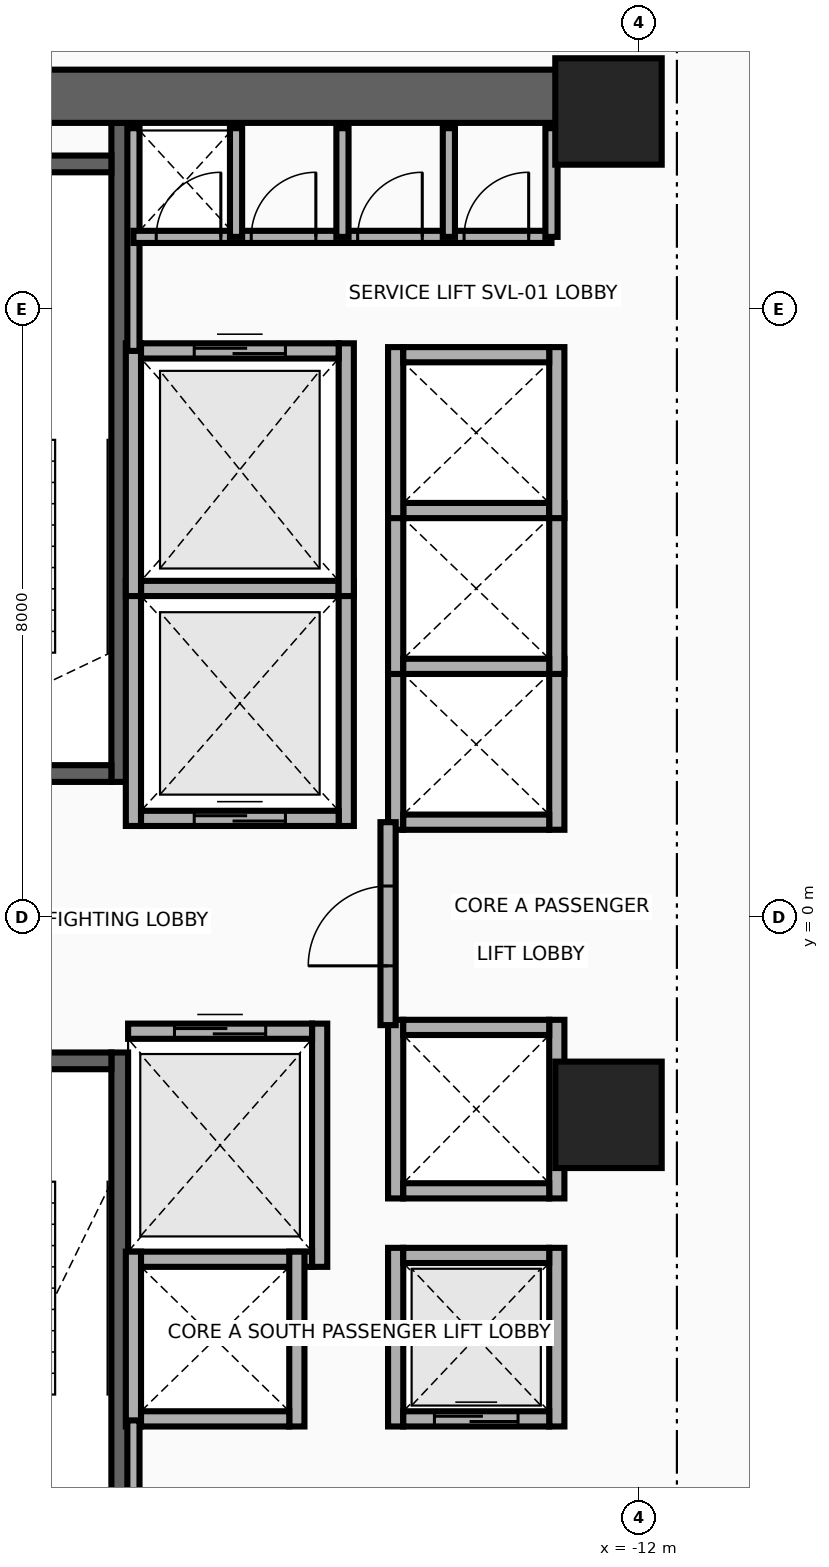
"""IFC4 building model, lengths in metres.
Left out: names, types, materials, properties, quantities, classifications, styles, units other than length and angle.
Written with IfcOpenShell. Run it as: python <this file> out.ifc"""

import sys

from ifc_helpers import new_model, si_unit, direction, frame, frame_2d, origin, origin_2d, place, context, subcontext, project, spatial, rectangle, extrude, source, transform, mapped, element, fill, save


model = new_model("IFC4")
c1 = context("Model", 3, precision=1e-05, world=origin(), true_north=direction((0.0, 1.0)))
c2 = subcontext(c1, "Body", "Model", "MODEL_VIEW")
j1 = project(units=[si_unit("LENGTHUNIT", "METRE"), si_unit("PLANEANGLEUNIT", "RADIAN")], contexts=[c1])
p1 = place(None, origin())
s1 = spatial("IfcSite", under=j1, at=p1, CompositionType="ELEMENT")
p2 = place(p1, origin())
s2 = spatial("IfcBuilding", under=s1, at=p2, CompositionType="ELEMENT")
p3 = place(p2, frame((0.0, 0.0, 77.8)))
s3 = spatial("IfcBuildingStorey", under=s2, at=p3, CompositionType="ELEMENT", Elevation=77.8)
p4 = place(p3, frame((-18.83, 1.78, 0.0), z_axis=(0.0, 0.0, 1.0), x_axis=(0.0, 1.0, 0.0)))
e1 = element("IfcWall", 1, at=p4, inside=s3, PredefinedType="SHEAR", context=c2, shape_type="SweptSolid", body=[
    extrude(rectangle(XDim=8.67, YDim=0.22, at=frame_2d((4.335, 0.0))), origin(), (0.0, 0.0, 1.0), 3.46),
])
p5 = place(p3, frame((-22.05, 1.89, 0.0), z_axis=(0.0, 0.0, 1.0), x_axis=(1.0, 0.0, 0.0)))
e2 = element("IfcWall", 2, at=p5, inside=s3, PredefinedType="SHEAR", context=c2, shape_type="SweptSolid", body=[
    extrude(rectangle(XDim=3.11, YDim=0.22, at=frame_2d((1.555, 0.0))), origin(), (0.0, 0.0, 1.0), 3.46),
])
p6 = place(p5, frame((1.0, 0.0, 0.0)))
e3 = element("IfcOpeningElement", 3, at=p6, cuts=e2, PredefinedType="OPENING", context=c2, shape_type="SweptSolid", body=[
    extrude(rectangle(XDim=1.1, YDim=2.15, at=frame_2d((0.55, 1.075))), frame((0.0, 0.125, 0.0), z_axis=(0.0, -1.0, 0.0), x_axis=(1.0, 0.0, 0.0)), (0.0, 0.0, 1.0), 0.25),
])
p7 = place(p3, frame((-22.05, 9.91, 0.0), z_axis=(0.0, 0.0, 1.0), x_axis=(1.0, 0.0, 0.0)))
e4 = element("IfcWall", 4, at=p7, inside=s3, PredefinedType="SHEAR", context=c2, shape_type="SweptSolid", body=[
    extrude(rectangle(XDim=3.11, YDim=0.22, at=frame_2d((1.555, 0.0))), origin(), (0.0, 0.0, 1.0), 3.46),
])
p8 = place(p3, frame((-18.83, -10.45, 0.0), z_axis=(0.0, 0.0, 1.0), x_axis=(0.0, 1.0, 0.0)))
e5 = element("IfcWall", 5, at=p8, inside=s3, PredefinedType="SHEAR", context=c2, shape_type="SweptSolid", body=[
    extrude(rectangle(XDim=8.67, YDim=0.22, at=frame_2d((4.335, 0.0))), origin(), (0.0, 0.0, 1.0), 3.46),
])
p9 = place(p3, frame((-22.05, -1.89, 0.0), z_axis=(0.0, 0.0, 1.0), x_axis=(1.0, 0.0, 0.0)))
e6 = element("IfcWall", 6, at=p9, inside=s3, PredefinedType="SHEAR", context=c2, shape_type="SweptSolid", body=[
    extrude(rectangle(XDim=3.11, YDim=0.22, at=frame_2d((1.555, 0.0))), origin(), (0.0, 0.0, 1.0), 3.46),
])
p10 = place(p9, frame((1.0, 0.0, 0.0)))
e7 = element("IfcOpeningElement", 7, at=p10, cuts=e6, PredefinedType="OPENING", context=c2, shape_type="SweptSolid", body=[
    extrude(rectangle(XDim=1.1, YDim=2.15, at=frame_2d((0.55, 1.075))), frame((0.0, 0.125, 0.0), z_axis=(0.0, -1.0, 0.0), x_axis=(1.0, 0.0, 0.0)), (0.0, 0.0, 1.0), 0.25),
])
p11 = place(p3, frame((-22.65, 10.8, 0.0), z_axis=(0.0, 0.0, 1.0), x_axis=(1.0, 0.0, 0.0)))
e8 = element("IfcWall", 8, at=p11, inside=s3, PredefinedType="SHEAR", context=c2, shape_type="SweptSolid", body=[
    extrude(rectangle(XDim=10.25, YDim=0.7, at=frame_2d((5.125, 0.0))), origin(), (0.0, 0.0, 1.0), 3.46),
])
m1 = source(origin(), c2, "Body", "SweptSolid", [
    extrude(rectangle(XDim=1.4, YDim=1.4, at=origin_2d()), origin(), (0.0, 0.0, 1.0), 3.7),
])
for number, where, z_axis, x_axis in (
    (9, (-12.4, -2.6, 0.0), (0.0, 0.0, 1.0), (1.0, 0.0, 0.0)),
    (10, (-12.4, 10.6, 0.0), (0.0, 0.0, 1.0), (1.0, 0.0, 0.0)),
):
    element("IfcColumn", number, at=place(p3, frame(where, z_axis=z_axis, x_axis=x_axis)), inside=s3, PredefinedType="COLUMN", context=c2, shape_type="MappedRepresentation", body=[
        mapped(m1, transform((0.0, 0.0, 0.0), x_axis=(1.0, 0.0, 0.0), y_axis=(0.0, 1.0, 0.0), z_axis=(0.0, 0.0, 1.0), scale=1.0)),
    ])
for number, where, z_axis, x_axis in (
    (11, (-18.65, 1.2, 0.0), (0.0, 0.0, 1.0), (0.0, 1.0, 0.0)),
    (12, (-15.85, 1.2, 0.0), (0.0, 0.0, 1.0), (0.0, 1.0, 0.0)),
):
    element("IfcWall", number, at=place(p3, frame(where, z_axis=z_axis, x_axis=x_axis)), inside=s3, PredefinedType="MOVABLE", context=c2, shape_type="SweptSolid", body=[
        extrude(rectangle(XDim=3.225, YDim=0.2, at=frame_2d((1.613, 0.0))), origin(), (0.0, 0.0, 1.0), 3.46),
    ])
p12 = place(p3, frame((-18.55, 1.3, 0.0), z_axis=(0.0, 0.0, 1.0), x_axis=(1.0, 0.0, 0.0)))
e13 = element("IfcWall", 13, at=p12, inside=s3, PredefinedType="MOVABLE", context=c2, shape_type="SweptSolid", body=[
    extrude(rectangle(XDim=2.6, YDim=0.2, at=frame_2d((1.3, 0.0))), origin(), (0.0, 0.0, 1.0), 3.46),
])
p13 = place(p12, frame((0.7, 0.0, 0.0)))
e14 = element("IfcOpeningElement", 14, at=p13, cuts=e13, PredefinedType="OPENING", context=c2, shape_type="SweptSolid", body=[
    extrude(rectangle(XDim=1.2, YDim=2.1, at=frame_2d((0.6, 1.05))), frame((0.0, 0.115, 0.0), z_axis=(0.0, -1.0, 0.0), x_axis=(1.0, 0.0, 0.0)), (0.0, 0.0, 1.0), 0.23),
])
p14 = place(p3, frame((-18.55, 4.325, 0.0), z_axis=(0.0, 0.0, 1.0), x_axis=(1.0, 0.0, 0.0)))
e15 = element("IfcWall", 15, at=p14, inside=s3, PredefinedType="MOVABLE", context=c2, shape_type="SweptSolid", body=[
    extrude(rectangle(XDim=2.6, YDim=0.2, at=frame_2d((1.3, 0.0))), origin(), (0.0, 0.0, 1.0), 3.46),
])
p15 = place(p3, frame((-16.2, -4.6, 0.0), z_axis=(0.0, 0.0, 1.0), x_axis=(0.0, 1.0, 0.0)))
e16 = element("IfcWall", 16, at=p15, inside=s3, PredefinedType="MOVABLE", context=c2, shape_type="SweptSolid", body=[
    extrude(rectangle(XDim=3.2, YDim=0.2, at=frame_2d((1.6, 0.0))), origin(), (0.0, 0.0, 1.0), 3.46),
])
p16 = place(p3, frame((-18.72, -4.5, 0.0), z_axis=(0.0, 0.0, 1.0), x_axis=(1.0, 0.0, 0.0)))
e17 = element("IfcWall", 17, at=p16, inside=s3, PredefinedType="MOVABLE", context=c2, shape_type="SweptSolid", body=[
    extrude(rectangle(XDim=2.42, YDim=0.2, at=frame_2d((1.21, 0.0))), origin(), (0.0, 0.0, 1.0), 3.46),
])
p17 = place(p3, frame((-18.72, -1.5, 0.0), z_axis=(0.0, 0.0, 1.0), x_axis=(1.0, 0.0, 0.0)))
e18 = element("IfcWall", 18, at=p17, inside=s3, PredefinedType="MOVABLE", context=c2, shape_type="SweptSolid", body=[
    extrude(rectangle(XDim=2.42, YDim=0.2, at=frame_2d((1.21, 0.0))), origin(), (0.0, 0.0, 1.0), 3.46),
])
p18 = place(p17, frame((0.61, 0.0, 0.0)))
e19 = element("IfcOpeningElement", 19, at=p18, cuts=e18, PredefinedType="OPENING", context=c2, shape_type="SweptSolid", body=[
    extrude(rectangle(XDim=1.2, YDim=2.1, at=frame_2d((0.6, 1.05))), frame((0.0, 0.115, 0.0), z_axis=(0.0, -1.0, 0.0), x_axis=(1.0, 0.0, 0.0)), (0.0, 0.0, 1.0), 0.23),
])
for number, where, z_axis, x_axis in (
    (20, (-18.65, 4.225, 0.0), (0.0, 0.0, 1.0), (0.0, 1.0, 0.0)),
    (21, (-15.85, 4.225, 0.0), (0.0, 0.0, 1.0), (0.0, 1.0, 0.0)),
):
    element("IfcWall", number, at=place(p3, frame(where, z_axis=z_axis, x_axis=x_axis)), inside=s3, PredefinedType="MOVABLE", context=c2, shape_type="SweptSolid", body=[
        extrude(rectangle(XDim=3.325, YDim=0.2, at=frame_2d((1.663, 0.0))), origin(), (0.0, 0.0, 1.0), 3.46),
    ])
p19 = place(p3, frame((-18.55, 7.45, 0.0), z_axis=(0.0, 0.0, 1.0), x_axis=(1.0, 0.0, 0.0)))
e22 = element("IfcWall", 22, at=p19, inside=s3, PredefinedType="MOVABLE", context=c2, shape_type="SweptSolid", body=[
    extrude(rectangle(XDim=2.6, YDim=0.2, at=frame_2d((1.3, 0.0))), origin(), (0.0, 0.0, 1.0), 3.46),
])
p20 = place(p19, frame((0.7, 0.0, 0.0)))
e23 = element("IfcOpeningElement", 23, at=p20, cuts=e22, PredefinedType="OPENING", context=c2, shape_type="SweptSolid", body=[
    extrude(rectangle(XDim=1.2, YDim=2.1, at=frame_2d((0.6, 1.05))), frame((0.0, 0.115, 0.0), z_axis=(0.0, -1.0, 0.0), x_axis=(1.0, 0.0, 0.0)), (0.0, 0.0, 1.0), 0.23),
])
for number, where, z_axis, x_axis in (
    (24, (-15.2, -6.7, 0.0), (0.0, 0.0, 1.0), (0.0, 1.0, 0.0)),
    (25, (-13.08, -6.7, 0.0), (0.0, 0.0, 1.0), (0.0, 1.0, 0.0)),
):
    element("IfcWall", number, at=place(p3, frame(where, z_axis=z_axis, x_axis=x_axis)), inside=s3, PredefinedType="MOVABLE", context=c2, shape_type="SweptSolid", body=[
        extrude(rectangle(XDim=2.35, YDim=0.2, at=frame_2d((1.175, 0.0))), origin(), (0.0, 0.0, 1.0), 3.46),
    ])
p21 = place(p3, frame((-15.1, -6.6, 0.0), z_axis=(0.0, 0.0, 1.0), x_axis=(1.0, 0.0, 0.0)))
e26 = element("IfcWall", 26, at=p21, inside=s3, PredefinedType="MOVABLE", context=c2, shape_type="SweptSolid", body=[
    extrude(rectangle(XDim=1.92, YDim=0.2, at=frame_2d((0.96, 0.0))), origin(), (0.0, 0.0, 1.0), 3.46),
])
p22 = place(p21, frame((0.41, 0.0, 0.0)))
e27 = element("IfcOpeningElement", 27, at=p22, cuts=e26, PredefinedType="OPENING", context=c2, shape_type="SweptSolid", body=[
    extrude(rectangle(XDim=1.1, YDim=2.1, at=frame_2d((0.55, 1.05))), frame((0.0, 0.115, 0.0), z_axis=(0.0, -1.0, 0.0), x_axis=(1.0, 0.0, 0.0)), (0.0, 0.0, 1.0), 0.23),
])
p23 = place(p3, frame((-15.1, -4.45, 0.0), z_axis=(0.0, 0.0, 1.0), x_axis=(1.0, 0.0, 0.0)))
e28 = element("IfcWall", 28, at=p23, inside=s3, PredefinedType="MOVABLE", context=c2, shape_type="SweptSolid", body=[
    extrude(rectangle(XDim=1.92, YDim=0.2, at=frame_2d((0.96, 0.0))), origin(), (0.0, 0.0, 1.0), 3.46),
])
for number, where, z_axis, x_axis in (
    (29, (-15.2, 1.15, 0.0), (0.0, 0.0, 1.0), (0.0, 1.0, 0.0)),
    (30, (-13.08, 1.15, 0.0), (0.0, 0.0, 1.0), (0.0, 1.0, 0.0)),
):
    element("IfcWall", number, at=place(p3, frame(where, z_axis=z_axis, x_axis=x_axis)), inside=s3, PredefinedType="MOVABLE", context=c2, shape_type="SweptSolid", body=[
        extrude(rectangle(XDim=2.25, YDim=0.2, at=frame_2d((1.125, 0.0))), origin(), (0.0, 0.0, 1.0), 3.46),
    ])
p24 = place(p3, frame((-15.1, 1.25, 0.0), z_axis=(0.0, 0.0, 1.0), x_axis=(1.0, 0.0, 0.0)))
e31 = element("IfcWall", 31, at=p24, inside=s3, PredefinedType="MOVABLE", context=c2, shape_type="SweptSolid", body=[
    extrude(rectangle(XDim=1.92, YDim=0.2, at=frame_2d((0.96, 0.0))), origin(), (0.0, 0.0, 1.0), 3.46),
])
for number, where, z_axis, x_axis in (
    (32, (-15.2, 3.2, 0.0), (0.0, 0.0, 1.0), (0.0, 1.0, 0.0)),
    (33, (-13.08, 3.2, 0.0), (0.0, 0.0, 1.0), (0.0, 1.0, 0.0)),
):
    element("IfcWall", number, at=place(p3, frame(where, z_axis=z_axis, x_axis=x_axis)), inside=s3, PredefinedType="MOVABLE", context=c2, shape_type="SweptSolid", body=[
        extrude(rectangle(XDim=2.25, YDim=0.2, at=frame_2d((1.125, 0.0))), origin(), (0.0, 0.0, 1.0), 3.46),
    ])
for number, where, z_axis, x_axis in (
    (34, (-15.1, 3.3, 0.0), (0.0, 0.0, 1.0), (1.0, 0.0, 0.0)),
    (35, (-15.1, 5.35, 0.0), (0.0, 0.0, 1.0), (1.0, 0.0, 0.0)),
):
    element("IfcWall", number, at=place(p3, frame(where, z_axis=z_axis, x_axis=x_axis)), inside=s3, PredefinedType="MOVABLE", context=c2, shape_type="SweptSolid", body=[
        extrude(rectangle(XDim=1.92, YDim=0.2, at=frame_2d((0.96, 0.0))), origin(), (0.0, 0.0, 1.0), 3.46),
    ])
for number, where, z_axis, x_axis in (
    (36, (-15.2, 5.25, 0.0), (0.0, 0.0, 1.0), (0.0, 1.0, 0.0)),
    (37, (-13.08, 5.25, 0.0), (0.0, 0.0, 1.0), (0.0, 1.0, 0.0)),
):
    element("IfcWall", number, at=place(p3, frame(where, z_axis=z_axis, x_axis=x_axis)), inside=s3, PredefinedType="MOVABLE", context=c2, shape_type="SweptSolid", body=[
        extrude(rectangle(XDim=2.25, YDim=0.2, at=frame_2d((1.125, 0.0))), origin(), (0.0, 0.0, 1.0), 3.46),
    ])
p25 = place(p3, frame((-15.1, 7.4, 0.0), z_axis=(0.0, 0.0, 1.0), x_axis=(1.0, 0.0, 0.0)))
e38 = element("IfcWall", 38, at=p25, inside=s3, PredefinedType="MOVABLE", context=c2, shape_type="SweptSolid", body=[
    extrude(rectangle(XDim=1.92, YDim=0.2, at=frame_2d((0.96, 0.0))), origin(), (0.0, 0.0, 1.0), 3.46),
])
for number, where, z_axis, x_axis in (
    (39, (-18.65, -6.7, 0.0), (0.0, 0.0, 1.0), (0.0, 1.0, 0.0)),
    (40, (-16.5, -6.7, 0.0), (0.0, 0.0, 1.0), (0.0, 1.0, 0.0)),
):
    element("IfcWall", number, at=place(p3, frame(where, z_axis=z_axis, x_axis=x_axis)), inside=s3, PredefinedType="MOVABLE", context=c2, shape_type="SweptSolid", body=[
        extrude(rectangle(XDim=2.3, YDim=0.2, at=frame_2d((1.15, 0.0))), origin(), (0.0, 0.0, 1.0), 3.46),
    ])
p26 = place(p3, frame((-18.55, -6.6, 0.0), z_axis=(0.0, 0.0, 1.0), x_axis=(1.0, 0.0, 0.0)))
e41 = element("IfcWall", 41, at=p26, inside=s3, PredefinedType="MOVABLE", context=c2, shape_type="SweptSolid", body=[
    extrude(rectangle(XDim=1.95, YDim=0.2, at=frame_2d((0.975, 0.0))), origin(), (0.0, 0.0, 1.0), 3.46),
])
for number, where, z_axis, x_axis in (
    (42, (-15.2, -3.7, 0.0), (0.0, 0.0, 1.0), (0.0, 1.0, 0.0)),
    (43, (-13.08, -3.7, 0.0), (0.0, 0.0, 1.0), (0.0, 1.0, 0.0)),
):
    element("IfcWall", number, at=place(p3, frame(where, z_axis=z_axis, x_axis=x_axis)), inside=s3, PredefinedType="MOVABLE", context=c2, shape_type="SweptSolid", body=[
        extrude(rectangle(XDim=2.35, YDim=0.2, at=frame_2d((1.175, 0.0))), origin(), (0.0, 0.0, 1.0), 3.46),
    ])
for number, where, z_axis, x_axis in (
    (44, (-15.1, -3.6, 0.0), (0.0, 0.0, 1.0), (1.0, 0.0, 0.0)),
    (45, (-15.1, -1.45, 0.0), (0.0, 0.0, 1.0), (1.0, 0.0, 0.0)),
):
    element("IfcWall", number, at=place(p3, frame(where, z_axis=z_axis, x_axis=x_axis)), inside=s3, PredefinedType="MOVABLE", context=c2, shape_type="SweptSolid", body=[
        extrude(rectangle(XDim=1.92, YDim=0.2, at=frame_2d((0.96, 0.0))), origin(), (0.0, 0.0, 1.0), 3.46),
    ])
p27 = place(p3, frame((-15.3, -1.42, 0.0), z_axis=(0.0, 0.0, 1.0), x_axis=(0.0, 1.0, 0.0)))
e46 = element("IfcWall", 46, at=p27, inside=s3, PredefinedType="PARTITIONING", context=c2, shape_type="SweptSolid", body=[
    extrude(rectangle(XDim=2.67, YDim=0.2, at=frame_2d((1.335, 0.0))), origin(), (0.0, 0.0, 1.0), 3.46),
])
p28 = place(p27, frame((0.78, 0.0, 0.0)))
e47 = element("IfcOpeningElement", 47, at=p28, cuts=e46, PredefinedType="OPENING", context=c2, shape_type="SweptSolid", body=[
    extrude(rectangle(XDim=1.05, YDim=2.15, at=frame_2d((0.525, 1.075))), frame((0.0, 0.115, 0.0), z_axis=(0.0, -1.0, 0.0), x_axis=(1.0, 0.0, 0.0)), (0.0, 0.0, 1.0), 0.23),
])
p29 = place(p3, frame((-18.65, 7.45, 0.0), z_axis=(0.0, 0.0, 1.0), x_axis=(0.0, 1.0, 0.0)))
e48 = element("IfcWall", 48, at=p29, inside=s3, PredefinedType="PARTITIONING", context=c2, shape_type="SweptSolid", body=[
    extrude(rectangle(XDim=2.93, YDim=0.16, at=frame_2d((1.465, 0.0))), origin(), (0.0, 0.0, 1.0), 3.46),
])
p30 = place(p3, frame((-18.65, -8.18, 0.0), z_axis=(0.0, 0.0, 1.0), x_axis=(0.0, 1.0, 0.0)))
e49 = element("IfcWall", 49, at=p30, inside=s3, PredefinedType="PARTITIONING", context=c2, shape_type="SweptSolid", body=[
    extrude(rectangle(XDim=1.56, YDim=0.16, at=frame_2d((0.78, 0.0))), origin(), (0.0, 0.0, 1.0), 3.46),
])
p31 = place(p3, frame((-18.65, 8.95, 0.0), z_axis=(0.0, 0.0, 1.0), x_axis=(1.0, 0.0, 0.0)))
e50 = element("IfcWall", 50, at=p31, inside=s3, PredefinedType="PARTITIONING", context=c2, shape_type="SweptSolid", body=[
    extrude(rectangle(XDim=5.5, YDim=0.16, at=frame_2d((2.75, 0.0))), origin(), (0.0, 0.0, 1.0), 3.46),
])
p32 = place(p31, frame((0.3, 0.0, 0.0)))
e51 = element("IfcOpeningElement", 51, at=p32, cuts=e50, PredefinedType="OPENING", context=c2, shape_type="SweptSolid", body=[
    extrude(rectangle(XDim=0.85, YDim=2.05, at=frame_2d((0.425, 1.025))), frame((0.0, 0.095, 0.0), z_axis=(0.0, -1.0, 0.0), x_axis=(1.0, 0.0, 0.0)), (0.0, 0.0, 1.0), 0.19),
])
p33 = place(p31, frame((1.55, 0.0, 0.0)))
e52 = element("IfcOpeningElement", 52, at=p33, cuts=e50, PredefinedType="OPENING", context=c2, shape_type="SweptSolid", body=[
    extrude(rectangle(XDim=0.85, YDim=2.05, at=frame_2d((0.425, 1.025))), frame((0.0, 0.095, 0.0), z_axis=(0.0, -1.0, 0.0), x_axis=(1.0, 0.0, 0.0)), (0.0, 0.0, 1.0), 0.19),
])
p34 = place(p31, frame((2.95, 0.0, 0.0)))
e53 = element("IfcOpeningElement", 53, at=p34, cuts=e50, PredefinedType="OPENING", context=c2, shape_type="SweptSolid", body=[
    extrude(rectangle(XDim=0.85, YDim=2.05, at=frame_2d((0.425, 1.025))), frame((0.0, 0.095, 0.0), z_axis=(0.0, -1.0, 0.0), x_axis=(1.0, 0.0, 0.0)), (0.0, 0.0, 1.0), 0.19),
])
p35 = place(p31, frame((4.35, 0.0, 0.0)))
e54 = element("IfcOpeningElement", 54, at=p35, cuts=e50, PredefinedType="OPENING", context=c2, shape_type="SweptSolid", body=[
    extrude(rectangle(XDim=0.85, YDim=2.05, at=frame_2d((0.425, 1.025))), frame((0.0, 0.095, 0.0), z_axis=(0.0, -1.0, 0.0), x_axis=(1.0, 0.0, 0.0)), (0.0, 0.0, 1.0), 0.19),
])
for number, where, z_axis, x_axis in (
    (55, (-13.15, 8.95, 0.0), (0.0, 0.0, 1.0), (0.0, 1.0, 0.0)),
    (56, (-17.3, 8.95, 0.0), (0.0, 0.0, 1.0), (0.0, 1.0, 0.0)),
    (57, (-15.9, 8.95, 0.0), (0.0, 0.0, 1.0), (0.0, 1.0, 0.0)),
    (58, (-14.5, 8.95, 0.0), (0.0, 0.0, 1.0), (0.0, 1.0, 0.0)),
):
    element("IfcWall", number, at=place(p3, frame(where, z_axis=z_axis, x_axis=x_axis)), inside=s3, PredefinedType="PARTITIONING", context=c2, shape_type="SweptSolid", body=[
        extrude(rectangle(XDim=1.43, YDim=0.16, at=frame_2d((0.715, 0.0))), origin(), (0.0, 0.0, 1.0), 3.46),
    ])
p36 = place(p13, origin())
e59 = element("IfcDoor", 59, at=p36, inside=s3, OperationType="DOUBLE_DOOR_SLIDING", PredefinedType="DOOR", context=c2, shape_type="SweptSolid", body=[
    extrude(rectangle(XDim=1.2, YDim=2.1, at=frame_2d((0.6, 1.05))), frame((0.0, 0.025, 0.0), z_axis=(0.0, -1.0, 0.0), x_axis=(1.0, 0.0, 0.0)), (0.0, 0.0, 1.0), 0.05),
])
fill(e14, e59)
p37 = place(p18, origin())
e60 = element("IfcDoor", 60, at=p37, inside=s3, OperationType="DOUBLE_DOOR_SLIDING", PredefinedType="DOOR", context=c2, shape_type="SweptSolid", body=[
    extrude(rectangle(XDim=1.2, YDim=2.1, at=frame_2d((0.6, 1.05))), frame((0.0, 0.025, 0.0), z_axis=(0.0, -1.0, 0.0), x_axis=(1.0, 0.0, 0.0)), (0.0, 0.0, 1.0), 0.05),
])
fill(e19, e60)
p38 = place(p20, origin())
e61 = element("IfcDoor", 61, at=p38, inside=s3, OperationType="DOUBLE_DOOR_SLIDING", PredefinedType="DOOR", context=c2, shape_type="SweptSolid", body=[
    extrude(rectangle(XDim=1.2, YDim=2.1, at=frame_2d((0.6, 1.05))), frame((0.0, 0.025, 0.0), z_axis=(0.0, -1.0, 0.0), x_axis=(1.0, 0.0, 0.0)), (0.0, 0.0, 1.0), 0.05),
])
fill(e23, e61)
p39 = place(p22, origin())
e62 = element("IfcDoor", 62, at=p39, inside=s3, OperationType="DOUBLE_DOOR_SLIDING", PredefinedType="DOOR", context=c2, shape_type="SweptSolid", body=[
    extrude(rectangle(XDim=1.1, YDim=2.1, at=frame_2d((0.55, 1.05))), frame((0.0, 0.025, 0.0), z_axis=(0.0, -1.0, 0.0), x_axis=(1.0, 0.0, 0.0)), (0.0, 0.0, 1.0), 0.05),
])
fill(e27, e62)
p40 = place(p28, origin())
e63 = element("IfcDoor", 63, at=p40, inside=s3, OperationType="SINGLE_SWING_RIGHT", PredefinedType="DOOR", context=c2, shape_type="SweptSolid", body=[
    extrude(rectangle(XDim=1.05, YDim=2.15, at=frame_2d((0.525, 1.075))), frame((0.0, 0.025, 0.0), z_axis=(0.0, -1.0, 0.0), x_axis=(1.0, 0.0, 0.0)), (0.0, 0.0, 1.0), 0.05),
])
fill(e47, e63)
p41 = place(p32, origin())
e64 = element("IfcDoor", 64, at=p41, inside=s3, OperationType="SINGLE_SWING_LEFT", PredefinedType="DOOR", context=c2, shape_type="SweptSolid", body=[
    extrude(rectangle(XDim=0.85, YDim=2.05, at=frame_2d((0.425, 1.025))), frame((0.0, 0.025, 0.0), z_axis=(0.0, -1.0, 0.0), x_axis=(1.0, 0.0, 0.0)), (0.0, 0.0, 1.0), 0.05),
])
fill(e51, e64)
p42 = place(p33, origin())
e65 = element("IfcDoor", 65, at=p42, inside=s3, OperationType="SINGLE_SWING_RIGHT", PredefinedType="DOOR", context=c2, shape_type="SweptSolid", body=[
    extrude(rectangle(XDim=0.85, YDim=2.05, at=frame_2d((0.425, 1.025))), frame((0.0, 0.025, 0.0), z_axis=(0.0, -1.0, 0.0), x_axis=(1.0, 0.0, 0.0)), (0.0, 0.0, 1.0), 0.05),
])
fill(e52, e65)
p43 = place(p34, origin())
e66 = element("IfcDoor", 66, at=p43, inside=s3, OperationType="SINGLE_SWING_LEFT", PredefinedType="DOOR", context=c2, shape_type="SweptSolid", body=[
    extrude(rectangle(XDim=0.85, YDim=2.05, at=frame_2d((0.425, 1.025))), frame((0.0, 0.025, 0.0), z_axis=(0.0, -1.0, 0.0), x_axis=(1.0, 0.0, 0.0)), (0.0, 0.0, 1.0), 0.05),
])
fill(e53, e66)
p44 = place(p35, origin())
e67 = element("IfcDoor", 67, at=p44, inside=s3, OperationType="SINGLE_SWING_RIGHT", PredefinedType="DOOR", context=c2, shape_type="SweptSolid", body=[
    extrude(rectangle(XDim=0.85, YDim=2.05, at=frame_2d((0.425, 1.025))), frame((0.0, 0.025, 0.0), z_axis=(0.0, -1.0, 0.0), x_axis=(1.0, 0.0, 0.0)), (0.0, 0.0, 1.0), 0.05),
])
fill(e54, e67)
save(model, sys.argv[1])
